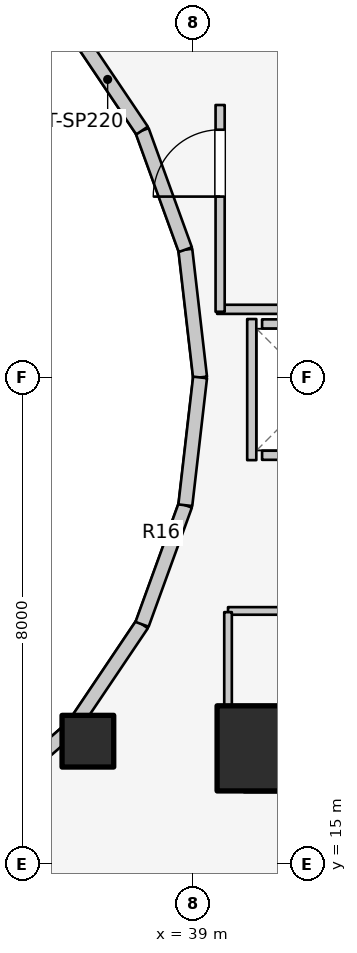
"""IFC4 building model, lengths in metres.
Left out: names, types, materials, properties, quantities, classifications, styles, units other than length and angle.
Written with IfcOpenShell. Run it as: python <this file> out.ifc"""

import sys

from ifc_helpers import new_model, si_unit, direction, frame, frame_2d, origin, origin_2d, place, context, subcontext, project, spatial, rectangle, extrude, element, fill, save


model = new_model("IFC4")
c1 = context("Model", 3, precision=1e-05, world=origin(), true_north=direction((0.0, 1.0)))
c2 = subcontext(c1, "Body", "Model", "MODEL_VIEW")
j1 = project(units=[si_unit("LENGTHUNIT", "METRE"), si_unit("PLANEANGLEUNIT", "RADIAN")], contexts=[c1])
p1 = place(None, origin())
s1 = spatial("IfcSite", under=j1, at=p1, CompositionType="ELEMENT")
p2 = place(p1, origin())
s2 = spatial("IfcBuilding", under=s1, at=p2, CompositionType="ELEMENT")
p3 = place(p2, frame((0.0, 0.0, 119.7)))
s3 = spatial("IfcBuildingStorey", under=s2, at=p3, CompositionType="ELEMENT", Elevation=119.7)
p4 = place(p3, frame((39.85, 16.55, 0.0), z_axis=(0.0, 0.0, 1.0), x_axis=(1.0, 0.0, 0.0)))
e1 = element("IfcWall", 1, at=p4, inside=s3, PredefinedType="SHEAR", context=c2, shape_type="SweptSolid", body=[
    extrude(rectangle(XDim=4.5, YDim=0.7, at=frame_2d((2.25, 0.0))), origin(), (0.0, 0.0, 1.0), 3.1),
])
p5 = place(p3, frame((40.1, 16.9, 0.0), z_axis=(0.0, 0.0, 1.0), x_axis=(1.0, 0.0, 0.0)))
e2 = element("IfcColumn", 2, at=p5, inside=s3, PredefinedType="COLUMN", context=c2, shape_type="SweptSolid", body=[
    extrude(rectangle(XDim=1.4, YDim=1.4, at=origin_2d()), origin(), (0.0, 0.0, 1.0), 3.1),
])
p6 = place(p3, frame((37.275, 17.018, 0.0), z_axis=(0.0, 0.0, 1.0), x_axis=(1.0, 0.0, 0.0)))
e3 = element("IfcColumn", 3, at=p6, inside=s3, PredefinedType="COLUMN", context=c2, shape_type="SweptSolid", body=[
    extrude(rectangle(XDim=0.85, YDim=0.85, at=origin_2d()), origin(), (0.0, 0.0, 1.0), 3.1),
])
p7 = place(p3, frame((39.12, 23.0, 0.0), z_axis=(0.0, 0.0, 1.0), x_axis=(-0.114711713601, 0.993398823617, 0.0)))
e4 = element("IfcWall", 4, at=p7, inside=s3, PredefinedType="STANDARD", context=c2, shape_type="SweptSolid", body=[
    extrude(rectangle(XDim=2.115, YDim=0.23, at=frame_2d((1.058, 0.0))), origin(), (0.0, 0.0, 1.0), 2.56),
])
p8 = place(p3, frame((38.877, 25.102, 0.0), z_axis=(0.0, 0.0, 1.0), x_axis=(-0.341423187295, 0.93990968033, 0.0)))
e5 = element("IfcWall", 5, at=p8, inside=s3, PredefinedType="STANDARD", context=c2, shape_type="SweptSolid", body=[
    extrude(rectangle(XDim=2.084, YDim=0.23, at=frame_2d((1.042, 0.0))), origin(), (0.0, 0.0, 1.0), 2.56),
])
p9 = place(p3, frame((38.166, 27.06, 0.0), z_axis=(0.0, 0.0, 1.0), x_axis=(-0.558197800898, 0.829707909492, 0.0)))
e6 = element("IfcWall", 6, at=p9, inside=s3, PredefinedType="STANDARD", context=c2, shape_type="SweptSolid", body=[
    extrude(rectangle(XDim=2.027, YDim=0.23, at=frame_2d((1.013, 0.0))), origin(), (0.0, 0.0, 1.0), 1.22),
])
p10 = place(p3, frame((35.56, 15.968, 0.0), z_axis=(0.0, 0.0, 1.0), x_axis=(0.752576694707, 0.658504607869, 0.0)))
e7 = element("IfcWall", 7, at=p10, inside=s3, PredefinedType="STANDARD", context=c2, shape_type="SweptSolid", body=[
    extrude(rectangle(XDim=1.959, YDim=0.23, at=frame_2d((0.98, 0.0))), origin(), (0.0, 0.0, 1.0), 1.22),
])
p11 = place(p3, frame((37.035, 17.258, 0.0), z_axis=(0.0, 0.0, 1.0), x_axis=(0.558197800898, 0.829707909492, 0.0)))
e8 = element("IfcWall", 8, at=p11, inside=s3, PredefinedType="STANDARD", context=c2, shape_type="SweptSolid", body=[
    extrude(rectangle(XDim=2.027, YDim=0.23, at=frame_2d((1.013, 0.0))), origin(), (0.0, 0.0, 1.0), 1.22),
])
p12 = place(p3, frame((38.166, 18.94, 0.0), z_axis=(0.0, 0.0, 1.0), x_axis=(0.341423187295, 0.93990968033, 0.0)))
e9 = element("IfcWall", 9, at=p12, inside=s3, PredefinedType="STANDARD", context=c2, shape_type="SweptSolid", body=[
    extrude(rectangle(XDim=2.084, YDim=0.23, at=frame_2d((1.042, 0.0))), origin(), (0.0, 0.0, 1.0), 2.56),
])
p13 = place(p3, frame((38.877, 20.898, 0.0), z_axis=(0.0, 0.0, 1.0), x_axis=(0.114711713601, 0.993398823617, 0.0)))
e10 = element("IfcWall", 10, at=p13, inside=s3, PredefinedType="STANDARD", context=c2, shape_type="SweptSolid", body=[
    extrude(rectangle(XDim=2.115, YDim=0.23, at=frame_2d((1.058, 0.0))), origin(), (0.0, 0.0, 1.0), 2.56),
])
for number, where, z_axis, x_axis in (
    (11, (40.14, 21.72, 0.0), (0.0, 0.0, 1.0), (1.0, 0.0, 0.0)),
    (12, (40.14, 23.88, 0.0), (0.0, 0.0, 1.0), (1.0, 0.0, 0.0)),
):
    element("IfcWall", number, at=place(p3, frame(where, z_axis=z_axis, x_axis=x_axis)), inside=s3, PredefinedType="SOLIDWALL", context=c2, shape_type="SweptSolid", body=[
        extrude(rectangle(XDim=1.82, YDim=0.15, at=frame_2d((0.91, 0.0))), origin(), (0.0, 0.0, 1.0), 2.12),
    ])
p14 = place(p3, frame((39.97, 21.64, 0.0), z_axis=(0.0, 0.0, 1.0), x_axis=(0.0, 1.0, 0.0)))
e13 = element("IfcWall", 13, at=p14, inside=s3, PredefinedType="SOLIDWALL", context=c2, shape_type="SweptSolid", body=[
    extrude(rectangle(XDim=2.32, YDim=0.15, at=frame_2d((1.16, 0.0))), origin(), (0.0, 0.0, 1.0), 2.12),
])
p15 = place(p3, frame((39.4, 24.12, 0.0), z_axis=(0.0, 0.0, 1.0), x_axis=(1.0, 0.0, 0.0)))
e14 = element("IfcWall", 14, at=p15, inside=s3, PredefinedType="PARTITIONING", context=c2, shape_type="SweptSolid", body=[
    extrude(rectangle(XDim=5.08, YDim=0.15, at=frame_2d((2.54, 0.0))), origin(), (0.0, 0.0, 1.0), 2.12),
])
p16 = place(p3, frame((39.45, 24.08, 0.0), z_axis=(0.0, 0.0, 1.0), x_axis=(0.0, 1.0, 0.0)))
e15 = element("IfcWall", 15, at=p16, inside=s3, PredefinedType="PARTITIONING", context=c2, shape_type="SweptSolid", body=[
    extrude(rectangle(XDim=3.4, YDim=0.15, at=frame_2d((1.7, 0.0))), origin(), (0.0, 0.0, 1.0), 2.575),
])
p17 = place(p16, frame((1.894, 0.0, 0.0)))
e16 = element("IfcOpeningElement", 16, at=p17, cuts=e15, PredefinedType="OPENING", context=c2, shape_type="SweptSolid", body=[
    extrude(rectangle(XDim=1.1, YDim=2.1, at=frame_2d((0.55, 1.05))), frame((0.0, 0.085, 0.0), z_axis=(0.0, -1.0, 0.0), x_axis=(1.0, 0.0, 0.0)), (0.0, 0.0, 1.0), 0.17),
])
p18 = place(p3, frame((39.58, 19.16, 0.0), z_axis=(0.0, 0.0, 1.0), x_axis=(1.0, 0.0, 0.0)))
e17 = element("IfcWall", 17, at=p18, inside=s3, PredefinedType="PARTITIONING", context=c2, shape_type="SweptSolid", body=[
    extrude(rectangle(XDim=4.87, YDim=0.125, at=frame_2d((2.435, 0.0))), origin(), (0.0, 0.0, 1.0), 2.12),
])
p19 = place(p18, frame((3.45, 0.0, 0.0)))
e18 = element("IfcOpeningElement", 18, at=p19, cuts=e17, PredefinedType="OPENING", context=c2, shape_type="SweptSolid", body=[
    extrude(rectangle(XDim=0.85, YDim=2.05, at=frame_2d((0.425, 1.025))), frame((0.0, 0.073, 0.0), z_axis=(0.0, -1.0, 0.0), x_axis=(1.0, 0.0, 0.0)), (0.0, 0.0, 1.0), 0.145),
])
p20 = place(p3, frame((39.58, 17.1, 0.0), z_axis=(0.0, 0.0, 1.0), x_axis=(0.0, 1.0, 0.0)))
e19 = element("IfcWall", 19, at=p20, inside=s3, PredefinedType="PARTITIONING", context=c2, shape_type="SweptSolid", body=[
    extrude(rectangle(XDim=2.04, YDim=0.125, at=frame_2d((1.02, 0.0))), origin(), (0.0, 0.0, 1.0), 1.873),
])
p21 = place(p3, frame((35.55, 15.985, 0.0), z_axis=(0.0, 0.0, 1.0), x_axis=(0.524565340045, -0.851370192116, 0.0)))
e20 = element("IfcWall", 20, at=p21, inside=s3, PredefinedType="PARTITIONING", context=c2, shape_type="SweptSolid", body=[
    extrude(rectangle(XDim=3.027, YDim=0.125, at=frame_2d((1.514, 0.0))), origin(), (0.0, 0.0, 1.0), 1.992),
])
p22 = place(p17, origin())
e21 = element("IfcDoor", 21, at=p22, inside=s3, OperationType="SINGLE_SWING_LEFT", PredefinedType="DOOR", context=c2, shape_type="SweptSolid", body=[
    extrude(rectangle(XDim=1.1, YDim=2.1, at=frame_2d((0.55, 1.05))), frame((0.0, 0.025, 0.0), z_axis=(0.0, -1.0, 0.0), x_axis=(1.0, 0.0, 0.0)), (0.0, 0.0, 1.0), 0.05),
])
fill(e16, e21)
save(model, sys.argv[1])
